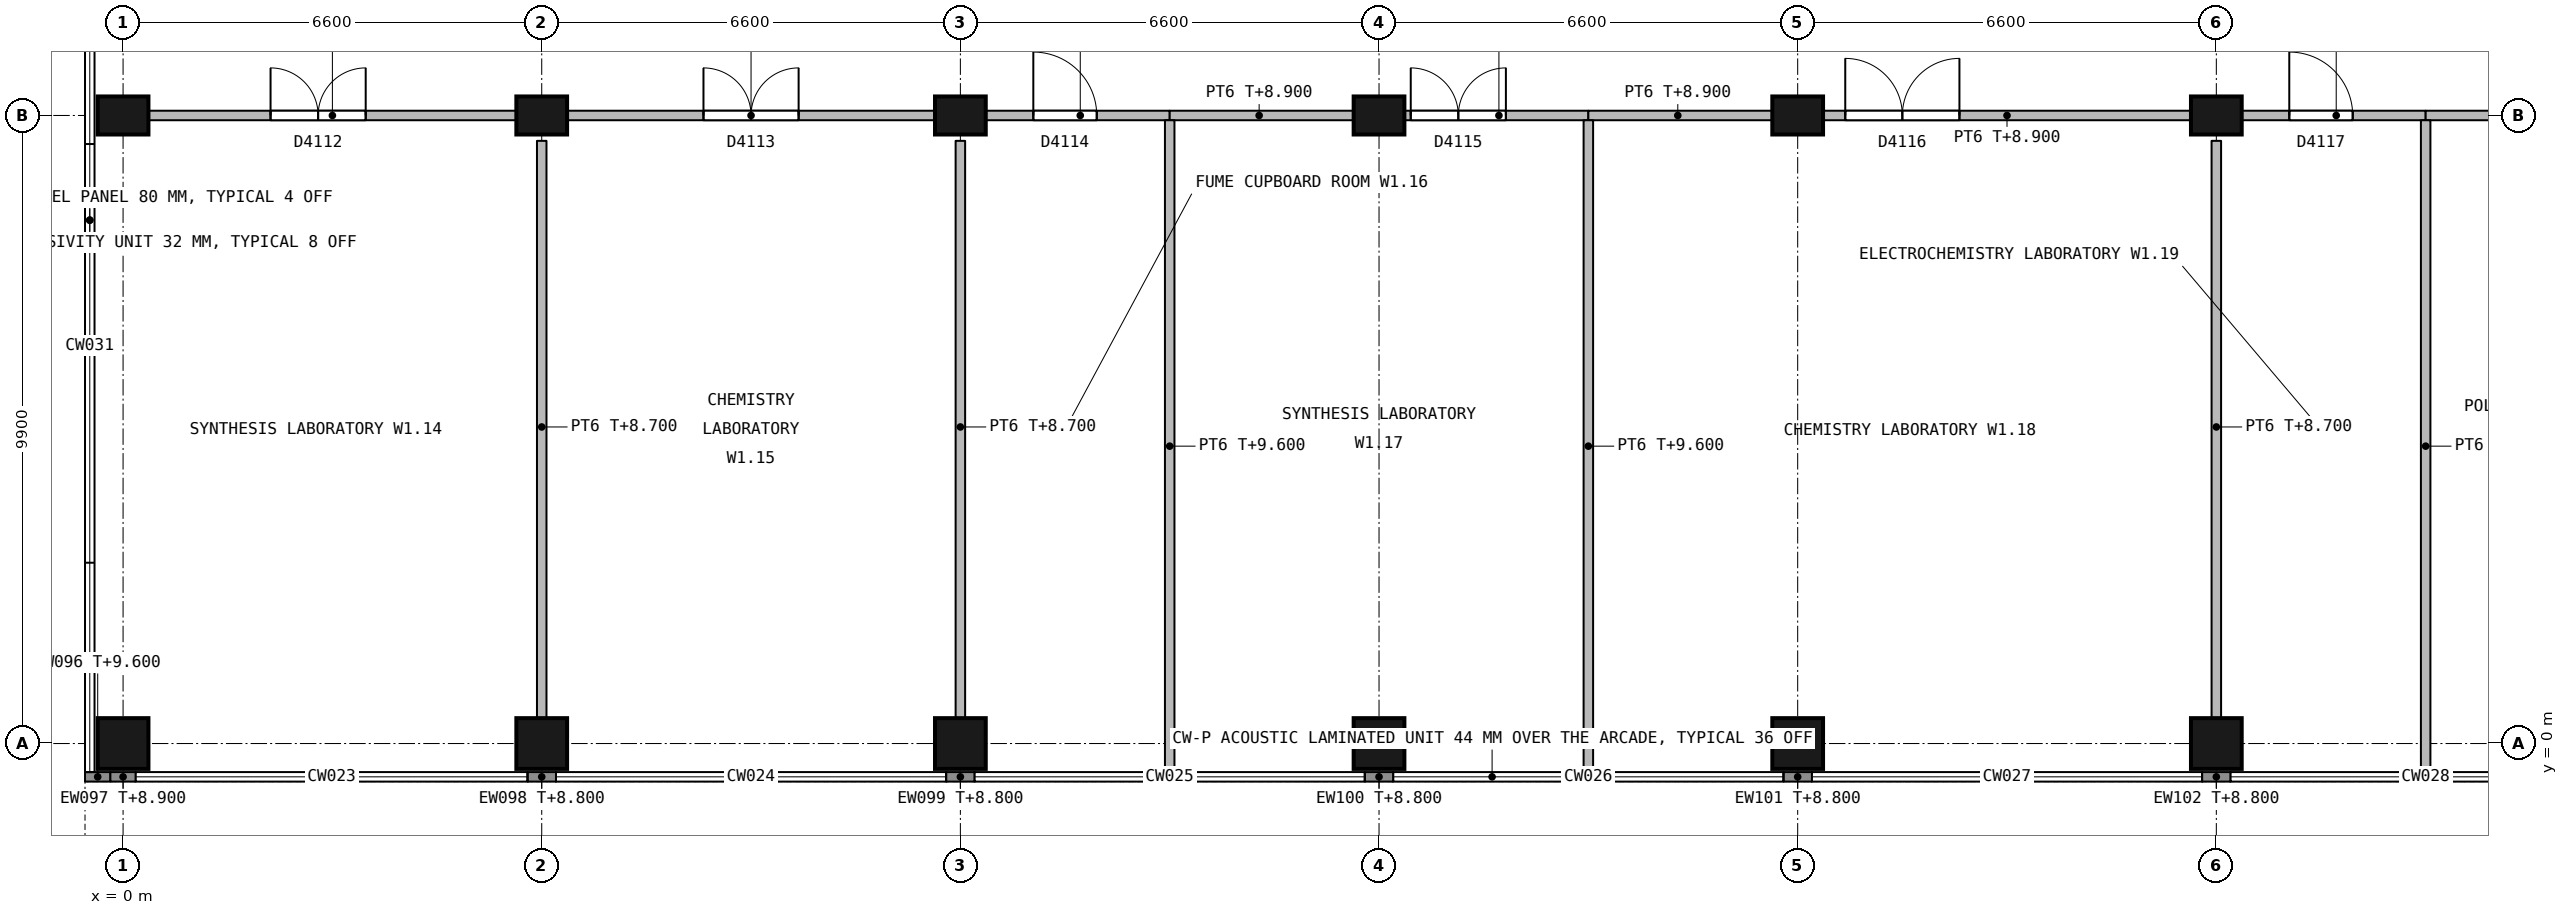
"""IFC4 building model, lengths in metres.
Left out: names, types, materials, properties, quantities, classifications, styles, units other than length and angle.
Written with IfcOpenShell. Run it as: python <this file> out.ifc"""

import sys

from ifc_helpers import new_model, si_unit, direction, frame, frame_2d, origin, origin_with_axes, origin_2d, place, context, subcontext, project, spatial, rectangle, extrude, element, fill, save


model = new_model("IFC4")
c1 = context("Model", 3, precision=1e-05, world=origin(), true_north=direction((0.0, 1.0)))
c2 = subcontext(c1, "Body", "Model", "MODEL_VIEW")
j1 = project(units=[si_unit("LENGTHUNIT", "METRE"), si_unit("PLANEANGLEUNIT", "RADIAN")], contexts=[c1])
p1 = place(None, origin())
s1 = spatial("IfcSite", under=j1, at=p1, CompositionType="ELEMENT")
p2 = place(p1, origin())
s2 = spatial("IfcBuilding", under=s1, at=p2, CompositionType="ELEMENT")
p3 = place(p2, frame((0.0, 0.0, 5.4)))
s3 = spatial("IfcBuildingStorey", under=s2, at=p3, CompositionType="ELEMENT", Elevation=5.4)
p4 = place(p3, origin_with_axes())
e1 = element("IfcColumn", 1, at=p4, inside=s3, PredefinedType="COLUMN", context=c2, shape_type="SweptSolid", body=[
    extrude(rectangle(XDim=0.8, YDim=0.8, at=origin_2d()), origin(), (0.0, 0.0, 1.0), 4.5),
])
p5 = place(p3, frame((0.0, 9.9, 0.0), z_axis=(0.0, 0.0, 1.0), x_axis=(1.0, 0.0, 0.0)))
e2 = element("IfcColumn", 2, at=p5, inside=s3, PredefinedType="COLUMN", context=c2, shape_type="SweptSolid", body=[
    extrude(rectangle(XDim=0.8, YDim=0.6, at=origin_2d()), origin(), (0.0, 0.0, 1.0), 4.5),
])
p6 = place(p3, frame((6.6, 0.0, 0.0), z_axis=(0.0, 0.0, 1.0), x_axis=(1.0, 0.0, 0.0)))
e3 = element("IfcColumn", 3, at=p6, inside=s3, PredefinedType="COLUMN", context=c2, shape_type="SweptSolid", body=[
    extrude(rectangle(XDim=0.8, YDim=0.8, at=origin_2d()), origin(), (0.0, 0.0, 1.0), 4.5),
])
p7 = place(p3, frame((6.6, 9.9, 0.0), z_axis=(0.0, 0.0, 1.0), x_axis=(1.0, 0.0, 0.0)))
e4 = element("IfcColumn", 4, at=p7, inside=s3, PredefinedType="COLUMN", context=c2, shape_type="SweptSolid", body=[
    extrude(rectangle(XDim=0.8, YDim=0.6, at=origin_2d()), origin(), (0.0, 0.0, 1.0), 4.5),
])
p8 = place(p3, frame((13.2, 0.0, 0.0), z_axis=(0.0, 0.0, 1.0), x_axis=(1.0, 0.0, 0.0)))
e5 = element("IfcColumn", 5, at=p8, inside=s3, PredefinedType="COLUMN", context=c2, shape_type="SweptSolid", body=[
    extrude(rectangle(XDim=0.8, YDim=0.8, at=origin_2d()), origin(), (0.0, 0.0, 1.0), 4.5),
])
p9 = place(p3, frame((13.2, 9.9, 0.0), z_axis=(0.0, 0.0, 1.0), x_axis=(1.0, 0.0, 0.0)))
e6 = element("IfcColumn", 6, at=p9, inside=s3, PredefinedType="COLUMN", context=c2, shape_type="SweptSolid", body=[
    extrude(rectangle(XDim=0.8, YDim=0.6, at=origin_2d()), origin(), (0.0, 0.0, 1.0), 4.5),
])
p10 = place(p3, frame((19.8, 0.0, 0.0), z_axis=(0.0, 0.0, 1.0), x_axis=(1.0, 0.0, 0.0)))
e7 = element("IfcColumn", 7, at=p10, inside=s3, PredefinedType="COLUMN", context=c2, shape_type="SweptSolid", body=[
    extrude(rectangle(XDim=0.8, YDim=0.8, at=origin_2d()), origin(), (0.0, 0.0, 1.0), 4.5),
])
p11 = place(p3, frame((19.8, 9.9, 0.0), z_axis=(0.0, 0.0, 1.0), x_axis=(1.0, 0.0, 0.0)))
e8 = element("IfcColumn", 8, at=p11, inside=s3, PredefinedType="COLUMN", context=c2, shape_type="SweptSolid", body=[
    extrude(rectangle(XDim=0.8, YDim=0.6, at=origin_2d()), origin(), (0.0, 0.0, 1.0), 4.5),
])
p12 = place(p3, frame((26.4, 0.0, 0.0), z_axis=(0.0, 0.0, 1.0), x_axis=(1.0, 0.0, 0.0)))
e9 = element("IfcColumn", 9, at=p12, inside=s3, PredefinedType="COLUMN", context=c2, shape_type="SweptSolid", body=[
    extrude(rectangle(XDim=0.8, YDim=0.8, at=origin_2d()), origin(), (0.0, 0.0, 1.0), 4.5),
])
p13 = place(p3, frame((26.4, 9.9, 0.0), z_axis=(0.0, 0.0, 1.0), x_axis=(1.0, 0.0, 0.0)))
e10 = element("IfcColumn", 10, at=p13, inside=s3, PredefinedType="COLUMN", context=c2, shape_type="SweptSolid", body=[
    extrude(rectangle(XDim=0.8, YDim=0.6, at=origin_2d()), origin(), (0.0, 0.0, 1.0), 4.5),
])
p14 = place(p3, frame((33.0, 0.0, 0.0), z_axis=(0.0, 0.0, 1.0), x_axis=(1.0, 0.0, 0.0)))
e11 = element("IfcColumn", 11, at=p14, inside=s3, PredefinedType="COLUMN", context=c2, shape_type="SweptSolid", body=[
    extrude(rectangle(XDim=0.8, YDim=0.8, at=origin_2d()), origin(), (0.0, 0.0, 1.0), 4.5),
])
p15 = place(p3, frame((33.0, 9.9, 0.0), z_axis=(0.0, 0.0, 1.0), x_axis=(1.0, 0.0, 0.0)))
e12 = element("IfcColumn", 12, at=p15, inside=s3, PredefinedType="COLUMN", context=c2, shape_type="SweptSolid", body=[
    extrude(rectangle(XDim=0.8, YDim=0.6, at=origin_2d()), origin(), (0.0, 0.0, 1.0), 4.5),
])
p16 = place(p3, frame((-0.2, -0.525, 0.0), z_axis=(0.0, 0.0, 1.0), x_axis=(-1.0, 0.0, 0.0)))
e13 = element("IfcWall", 13, at=p16, inside=s3, PredefinedType="STANDARD", context=c2, shape_type="SweptSolid", body=[
    extrude(rectangle(XDim=0.4, YDim=0.15, at=frame_2d((0.2, 0.0))), origin(), (0.0, 0.0, 1.0), 4.2),
])
p17 = place(p3, frame((0.2, -0.525, 0.0), z_axis=(0.0, 0.0, 1.0), x_axis=(-1.0, 0.0, 0.0)))
e14 = element("IfcWall", 14, at=p17, inside=s3, PredefinedType="STANDARD", context=c2, shape_type="SweptSolid", body=[
    extrude(rectangle(XDim=0.4, YDim=0.15, at=frame_2d((0.2, 0.0))), origin(), (0.0, 0.0, 1.0), 3.5),
])
for number, where, z_axis, x_axis in (
    (15, (6.825, -0.525, 0.0), (0.0, 0.0, 1.0), (-1.0, 0.0, 0.0)),
    (16, (13.425, -0.525, 0.0), (0.0, 0.0, 1.0), (-1.0, 0.0, 0.0)),
    (17, (20.025, -0.525, 0.0), (0.0, 0.0, 1.0), (-1.0, 0.0, 0.0)),
    (18, (26.625, -0.525, 0.0), (0.0, 0.0, 1.0), (-1.0, 0.0, 0.0)),
):
    element("IfcWall", number, at=place(p3, frame(where, z_axis=z_axis, x_axis=x_axis)), inside=s3, PredefinedType="STANDARD", context=c2, shape_type="SweptSolid", body=[
        extrude(rectangle(XDim=0.45, YDim=0.15, at=frame_2d((0.225, 0.0))), origin(), (0.0, 0.0, 1.0), 3.4),
    ])
p18 = place(p3, frame((33.225, -0.525, 0.0), z_axis=(0.0, 0.0, 1.0), x_axis=(-1.0, 0.0, 0.0)))
e19 = element("IfcWall", 19, at=p18, inside=s3, PredefinedType="STANDARD", context=c2, shape_type="SweptSolid", body=[
    extrude(rectangle(XDim=0.45, YDim=0.15, at=frame_2d((0.225, 0.0))), origin(), (0.0, 0.0, 1.0), 3.4),
])
p19 = place(p3, frame((0.4, 9.9, 0.0), z_axis=(0.0, 0.0, 1.0), x_axis=(1.0, 0.0, 0.0)))
e20 = element("IfcWall", 20, at=p19, inside=s3, PredefinedType="PARTITIONING", context=c2, shape_type="SweptSolid", body=[
    extrude(rectangle(XDim=5.8, YDim=0.15, at=frame_2d((2.9, 0.0))), origin(), (0.0, 0.0, 1.0), 3.5),
])
p20 = place(p19, frame((1.925, 0.0, 0.0)))
e21 = element("IfcOpeningElement", 21, at=p20, cuts=e20, PredefinedType="OPENING", context=c2, shape_type="SweptSolid", body=[
    extrude(rectangle(XDim=1.5, YDim=2.1, at=frame_2d((0.75, 1.05))), frame((0.0, 0.085, 0.0), z_axis=(0.0, -1.0, 0.0), x_axis=(1.0, 0.0, 0.0)), (0.0, 0.0, 1.0), 0.17),
])
p21 = place(p3, frame((7.0, 9.9, 0.0), z_axis=(0.0, 0.0, 1.0), x_axis=(1.0, 0.0, 0.0)))
e22 = element("IfcWall", 22, at=p21, inside=s3, PredefinedType="PARTITIONING", context=c2, shape_type="SweptSolid", body=[
    extrude(rectangle(XDim=5.8, YDim=0.15, at=frame_2d((2.9, 0.0))), origin(), (0.0, 0.0, 1.0), 3.5),
])
p22 = place(p21, frame((2.15, 0.0, 0.0)))
e23 = element("IfcOpeningElement", 23, at=p22, cuts=e22, PredefinedType="OPENING", context=c2, shape_type="SweptSolid", body=[
    extrude(rectangle(XDim=1.5, YDim=2.1, at=frame_2d((0.75, 1.05))), frame((0.0, 0.085, 0.0), z_axis=(0.0, -1.0, 0.0), x_axis=(1.0, 0.0, 0.0)), (0.0, 0.0, 1.0), 0.17),
])
p23 = place(p3, frame((13.6, 9.9, 0.0), z_axis=(0.0, 0.0, 1.0), x_axis=(1.0, 0.0, 0.0)))
e24 = element("IfcWall", 24, at=p23, inside=s3, PredefinedType="PARTITIONING", context=c2, shape_type="SweptSolid", body=[
    extrude(rectangle(XDim=2.9, YDim=0.15, at=frame_2d((1.45, 0.0))), origin(), (0.0, 0.0, 1.0), 3.5),
])
p24 = place(p23, frame((0.75, 0.0, 0.0)))
e25 = element("IfcOpeningElement", 25, at=p24, cuts=e24, PredefinedType="OPENING", context=c2, shape_type="SweptSolid", body=[
    extrude(rectangle(XDim=1.0, YDim=2.1, at=frame_2d((0.5, 1.05))), frame((0.0, 0.085, 0.0), z_axis=(0.0, -1.0, 0.0), x_axis=(1.0, 0.0, 0.0)), (0.0, 0.0, 1.0), 0.17),
])
p25 = place(p3, frame((16.5, 9.9, 0.0), z_axis=(0.0, 0.0, 1.0), x_axis=(1.0, 0.0, 0.0)))
e26 = element("IfcWall", 26, at=p25, inside=s3, PredefinedType="PARTITIONING", context=c2, shape_type="SweptSolid", body=[
    extrude(rectangle(XDim=2.9, YDim=0.15, at=frame_2d((1.45, 0.0))), origin(), (0.0, 0.0, 1.0), 3.5),
])
p26 = place(p3, frame((20.2, 9.9, 0.0), z_axis=(0.0, 0.0, 1.0), x_axis=(1.0, 0.0, 0.0)))
e27 = element("IfcWall", 27, at=p26, inside=s3, PredefinedType="PARTITIONING", context=c2, shape_type="SweptSolid", body=[
    extrude(rectangle(XDim=2.9, YDim=0.15, at=frame_2d((1.45, 0.0))), origin(), (0.0, 0.0, 1.0), 3.5),
])
p27 = place(p26, frame((0.1, 0.0, 0.0)))
e28 = element("IfcOpeningElement", 28, at=p27, cuts=e27, PredefinedType="OPENING", context=c2, shape_type="SweptSolid", body=[
    extrude(rectangle(XDim=1.5, YDim=2.1, at=frame_2d((0.75, 1.05))), frame((0.0, 0.085, 0.0), z_axis=(0.0, -1.0, 0.0), x_axis=(1.0, 0.0, 0.0)), (0.0, 0.0, 1.0), 0.17),
])
p28 = place(p3, frame((23.1, 9.9, 0.0), z_axis=(0.0, 0.0, 1.0), x_axis=(1.0, 0.0, 0.0)))
e29 = element("IfcWall", 29, at=p28, inside=s3, PredefinedType="PARTITIONING", context=c2, shape_type="SweptSolid", body=[
    extrude(rectangle(XDim=2.9, YDim=0.15, at=frame_2d((1.45, 0.0))), origin(), (0.0, 0.0, 1.0), 3.5),
])
p29 = place(p3, frame((26.8, 9.9, 0.0), z_axis=(0.0, 0.0, 1.0), x_axis=(1.0, 0.0, 0.0)))
e30 = element("IfcWall", 30, at=p29, inside=s3, PredefinedType="PARTITIONING", context=c2, shape_type="SweptSolid", body=[
    extrude(rectangle(XDim=5.8, YDim=0.15, at=frame_2d((2.9, 0.0))), origin(), (0.0, 0.0, 1.0), 3.5),
])
p30 = place(p29, frame((0.35, 0.0, 0.0)))
e31 = element("IfcOpeningElement", 31, at=p30, cuts=e30, PredefinedType="OPENING", context=c2, shape_type="SweptSolid", body=[
    extrude(rectangle(XDim=1.8, YDim=2.4, at=frame_2d((0.9, 1.2))), frame((0.0, 0.085, 0.0), z_axis=(0.0, -1.0, 0.0), x_axis=(1.0, 0.0, 0.0)), (0.0, 0.0, 1.0), 0.17),
])
p31 = place(p3, frame((33.4, 9.9, 0.0), z_axis=(0.0, 0.0, 1.0), x_axis=(1.0, 0.0, 0.0)))
e32 = element("IfcWall", 32, at=p31, inside=s3, PredefinedType="PARTITIONING", context=c2, shape_type="SweptSolid", body=[
    extrude(rectangle(XDim=2.9, YDim=0.15, at=frame_2d((1.45, 0.0))), origin(), (0.0, 0.0, 1.0), 3.5),
])
p32 = place(p31, frame((0.75, 0.0, 0.0)))
e33 = element("IfcOpeningElement", 33, at=p32, cuts=e32, PredefinedType="OPENING", context=c2, shape_type="SweptSolid", body=[
    extrude(rectangle(XDim=1.0, YDim=2.1, at=frame_2d((0.5, 1.05))), frame((0.0, 0.085, 0.0), z_axis=(0.0, -1.0, 0.0), x_axis=(1.0, 0.0, 0.0)), (0.0, 0.0, 1.0), 0.17),
])
p33 = place(p3, frame((36.3, 9.9, 0.0), z_axis=(0.0, 0.0, 1.0), x_axis=(1.0, 0.0, 0.0)))
e34 = element("IfcWall", 34, at=p33, inside=s3, PredefinedType="PARTITIONING", context=c2, shape_type="SweptSolid", body=[
    extrude(rectangle(XDim=2.9, YDim=0.15, at=frame_2d((1.45, 0.0))), origin(), (0.0, 0.0, 1.0), 3.5),
])
p34 = place(p33, frame((1.3, 0.0, 0.0)))
e35 = element("IfcOpeningElement", 35, at=p34, cuts=e34, PredefinedType="OPENING", context=c2, shape_type="SweptSolid", body=[
    extrude(rectangle(XDim=1.5, YDim=2.1, at=frame_2d((0.75, 1.05))), frame((0.0, 0.085, 0.0), z_axis=(0.0, -1.0, 0.0), x_axis=(1.0, 0.0, 0.0)), (0.0, 0.0, 1.0), 0.17),
])
for number, where, z_axis, x_axis in (
    (36, (6.6, 0.4, 0.0), (0.0, 0.0, 1.0), (0.0, 1.0, 0.0)),
    (37, (13.2, 0.4, 0.0), (0.0, 0.0, 1.0), (0.0, 1.0, 0.0)),
):
    element("IfcWall", number, at=place(p3, frame(where, z_axis=z_axis, x_axis=x_axis)), inside=s3, PredefinedType="PARTITIONING", context=c2, shape_type="SweptSolid", body=[
        extrude(rectangle(XDim=9.1, YDim=0.15, at=frame_2d((4.55, 0.0))), origin(), (0.0, 0.0, 1.0), 3.3),
    ])
for number, where, z_axis, x_axis in (
    (38, (16.5, -0.45, 0.0), (0.0, 0.0, 1.0), (0.0, 1.0, 0.0)),
    (39, (23.1, -0.45, 0.0), (0.0, 0.0, 1.0), (0.0, 1.0, 0.0)),
):
    element("IfcWall", number, at=place(p3, frame(where, z_axis=z_axis, x_axis=x_axis)), inside=s3, PredefinedType="PARTITIONING", context=c2, shape_type="SweptSolid", body=[
        extrude(rectangle(XDim=10.275, YDim=0.15, at=frame_2d((5.137, 0.0))), origin(), (0.0, 0.0, 1.0), 4.2),
    ])
p35 = place(p3, frame((33.0, 0.4, 0.0), z_axis=(0.0, 0.0, 1.0), x_axis=(0.0, 1.0, 0.0)))
e40 = element("IfcWall", 40, at=p35, inside=s3, PredefinedType="PARTITIONING", context=c2, shape_type="SweptSolid", body=[
    extrude(rectangle(XDim=9.1, YDim=0.15, at=frame_2d((4.55, 0.0))), origin(), (0.0, 0.0, 1.0), 3.3),
])
p36 = place(p3, frame((36.3, -0.45, 0.0), z_axis=(0.0, 0.0, 1.0), x_axis=(0.0, 1.0, 0.0)))
e41 = element("IfcWall", 41, at=p36, inside=s3, PredefinedType="PARTITIONING", context=c2, shape_type="SweptSolid", body=[
    extrude(rectangle(XDim=10.275, YDim=0.15, at=frame_2d((5.137, 0.0))), origin(), (0.0, 0.0, 1.0), 4.2),
])
p37 = place(p20, origin())
e42 = element("IfcDoor", 42, at=p37, inside=s3, OperationType="DOUBLE_DOOR_SINGLE_SWING", PredefinedType="DOOR", context=c2, shape_type="SweptSolid", body=[
    extrude(rectangle(XDim=1.5, YDim=2.1, at=frame_2d((0.75, 1.05))), frame((0.0, 0.027, 0.0), z_axis=(0.0, -1.0, 0.0), x_axis=(1.0, 0.0, 0.0)), (0.0, 0.0, 1.0), 0.054),
])
fill(e21, e42)
p38 = place(p22, origin())
e43 = element("IfcDoor", 43, at=p38, inside=s3, OperationType="DOUBLE_DOOR_SINGLE_SWING", PredefinedType="DOOR", context=c2, shape_type="SweptSolid", body=[
    extrude(rectangle(XDim=1.5, YDim=2.1, at=frame_2d((0.75, 1.05))), frame((0.0, 0.027, 0.0), z_axis=(0.0, -1.0, 0.0), x_axis=(1.0, 0.0, 0.0)), (0.0, 0.0, 1.0), 0.054),
])
fill(e23, e43)
p39 = place(p24, origin())
e44 = element("IfcDoor", 44, at=p39, inside=s3, OperationType="SINGLE_SWING_LEFT", PredefinedType="DOOR", context=c2, shape_type="SweptSolid", body=[
    extrude(rectangle(XDim=1.0, YDim=2.1, at=frame_2d((0.5, 1.05))), frame((0.0, 0.027, 0.0), z_axis=(0.0, -1.0, 0.0), x_axis=(1.0, 0.0, 0.0)), (0.0, 0.0, 1.0), 0.054),
])
fill(e25, e44)
p40 = place(p27, origin())
e45 = element("IfcDoor", 45, at=p40, inside=s3, OperationType="DOUBLE_DOOR_SINGLE_SWING", PredefinedType="DOOR", context=c2, shape_type="SweptSolid", body=[
    extrude(rectangle(XDim=1.5, YDim=2.1, at=frame_2d((0.75, 1.05))), frame((0.0, 0.027, 0.0), z_axis=(0.0, -1.0, 0.0), x_axis=(1.0, 0.0, 0.0)), (0.0, 0.0, 1.0), 0.054),
])
fill(e28, e45)
p41 = place(p30, origin())
e46 = element("IfcDoor", 46, at=p41, inside=s3, OperationType="DOUBLE_DOOR_SINGLE_SWING", PredefinedType="DOOR", context=c2, shape_type="SweptSolid", body=[
    extrude(rectangle(XDim=1.8, YDim=2.4, at=frame_2d((0.9, 1.2))), frame((0.0, 0.027, 0.0), z_axis=(0.0, -1.0, 0.0), x_axis=(1.0, 0.0, 0.0)), (0.0, 0.0, 1.0), 0.054),
])
fill(e31, e46)
p42 = place(p32, origin())
e47 = element("IfcDoor", 47, at=p42, inside=s3, OperationType="SINGLE_SWING_LEFT", PredefinedType="DOOR", context=c2, shape_type="SweptSolid", body=[
    extrude(rectangle(XDim=1.0, YDim=2.1, at=frame_2d((0.5, 1.05))), frame((0.0, 0.027, 0.0), z_axis=(0.0, -1.0, 0.0), x_axis=(1.0, 0.0, 0.0)), (0.0, 0.0, 1.0), 0.054),
])
fill(e33, e47)
save(model, sys.argv[1])
